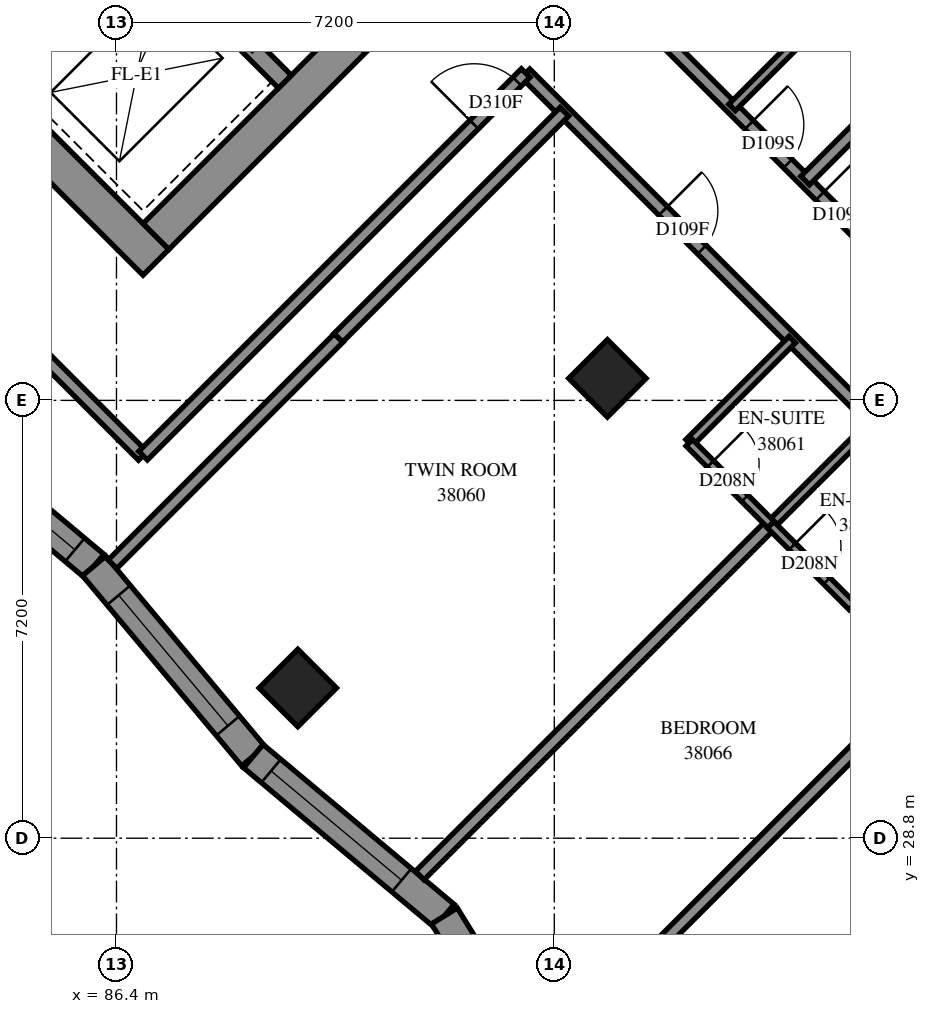
"""IFC4 building model, lengths in metres.
Left out: names, types, materials, properties, quantities, classifications, styles, units other than length and angle.
Written with IfcOpenShell. Run it as: python <this file> out.ifc"""

import sys

from ifc_helpers import new_model, si_unit, direction, frame, frame_2d, origin, origin_2d, place, context, subcontext, project, spatial, polyline, rectangle, outline, extrude, element, fill, save


model = new_model("IFC4")
c1 = context("Model", 3, precision=1e-05, world=origin(), true_north=direction((0.0, 1.0)))
c2 = subcontext(c1, "Body", "Model", "MODEL_VIEW")
j1 = project(units=[si_unit("LENGTHUNIT", "METRE"), si_unit("PLANEANGLEUNIT", "RADIAN")], contexts=[c1])
p1 = place(None, origin())
s1 = spatial("IfcSite", under=j1, at=p1, CompositionType="ELEMENT")
p2 = place(p1, origin())
s2 = spatial("IfcBuilding", under=s1, at=p2, CompositionType="ELEMENT")
p3 = place(p2, frame((0.0, 0.0, 142.2)))
s3 = spatial("IfcBuildingStorey", under=s2, at=p3, CompositionType="ELEMENT", Elevation=142.2)
for number, where, z_axis, x_axis in (
    (1, (94.474, 36.362, 0.0), (0.0, 0.0, 1.0), (0.707, -0.707, 0.0)),
    (2, (89.382, 31.271, 0.0), (0.0, 0.0, 1.0), (0.707, -0.707, 0.0)),
):
    element("IfcColumn", number, at=place(p3, frame(where, z_axis=z_axis, x_axis=x_axis)), inside=s3, PredefinedType="COLUMN", context=c2, shape_type="SweptSolid", body=[
        extrude(rectangle(XDim=0.9, YDim=0.9, at=origin_2d()), origin(), (0.0, 0.0, 1.0), 3.1),
    ])
p4 = place(p3, frame((76.018, 49.302, -0.3), z_axis=(0.0, 0.0, 1.0), x_axis=(0.7071067812, -0.7071067812, 0.0)))
e3 = element("IfcWall", 3, at=p4, inside=s3, PredefinedType="SHEAR", context=c2, shape_type="SweptSolid", body=[
    extrude(rectangle(XDim=15.6, YDim=0.6, at=frame_2d((7.8, 0.0))), origin(), (0.0, 0.0, 1.0), 2.7),
])
p5 = place(p3, frame((87.049, 38.695, -0.3), z_axis=(0.0, 0.0, 1.0), x_axis=(0.7071067812, 0.7071067812, 0.0)))
e4 = element("IfcWall", 4, at=p5, inside=s3, PredefinedType="SHEAR", context=c2, shape_type="SweptSolid", body=[
    extrude(rectangle(XDim=14.4, YDim=0.6, at=frame_2d((7.2, 0.0))), origin(), (0.0, 0.0, 1.0), 2.7),
])
p6 = place(p5, frame((4.55, 0.0, 0.3)))
e5 = element("IfcOpeningElement", 5, at=p6, cuts=e4, PredefinedType="OPENING", context=c2, shape_type="SweptSolid", body=[
    extrude(rectangle(XDim=1.1, YDim=2.1, at=frame_2d((0.55, 1.05))), frame((0.0, 0.31, 0.0), z_axis=(0.0, -1.0, 0.0), x_axis=(1.0, 0.0, 0.0)), (0.0, 0.0, 1.0), 0.62),
])
p7 = place(p5, frame((11.35, 0.0, 0.3)))
e6 = element("IfcOpeningElement", 6, at=p7, cuts=e4, PredefinedType="OPENING", context=c2, shape_type="SweptSolid", body=[
    extrude(rectangle(XDim=1.1, YDim=2.1, at=frame_2d((0.55, 1.05))), frame((0.0, 0.31, 0.0), z_axis=(0.0, -1.0, 0.0), x_axis=(1.0, 0.0, 0.0)), (0.0, 0.0, 1.0), 0.62),
])
p8 = place(p3, frame((84.291, 41.453, 0.0), z_axis=(0.0, 0.0, 1.0), x_axis=(0.7071067812, 0.7071067812, 0.0)))
e7 = element("IfcWall", 7, at=p8, inside=s3, PredefinedType="SOLIDWALL", context=c2, shape_type="SweptSolid", body=[
    extrude(rectangle(XDim=3.3, YDim=0.3, at=frame_2d((1.65, 0.0))), origin(), (0.0, 0.0, 1.0), 3.1),
])
p9 = place(p3, frame((78.988, 51.423, 0.0), z_axis=(0.0, 0.0, 1.0), x_axis=(0.7071067812, -0.7071067812, 0.0)))
e8 = element("IfcWall", 8, at=p9, inside=s3, PredefinedType="SOLIDWALL", context=c2, shape_type="SweptSolid", body=[
    extrude(rectangle(XDim=14.4, YDim=0.3, at=frame_2d((7.2, 0.0))), origin(), (0.0, 0.0, 1.0), 3.1),
])
p10 = place(p9, frame((1.35, 0.0, 0.0)))
e9 = element("IfcOpeningElement", 9, at=p10, cuts=e8, PredefinedType="OPENING", context=c2, shape_type="SweptSolid", body=[
    extrude(rectangle(XDim=0.9, YDim=2.1, at=frame_2d((0.45, 1.05))), frame((0.0, 0.16, 0.0), z_axis=(0.0, -1.0, 0.0), x_axis=(1.0, 0.0, 0.0)), (0.0, 0.0, 1.0), 0.32),
])
p11 = place(p9, frame((4.95, 0.0, 0.0)))
e10 = element("IfcOpeningElement", 10, at=p11, cuts=e8, PredefinedType="OPENING", context=c2, shape_type="SweptSolid", body=[
    extrude(rectangle(XDim=0.9, YDim=2.1, at=frame_2d((0.45, 1.05))), frame((0.0, 0.16, 0.0), z_axis=(0.0, -1.0, 0.0), x_axis=(1.0, 0.0, 0.0)), (0.0, 0.0, 1.0), 0.32),
])
p12 = place(p9, frame((8.55, 0.0, 0.0)))
e11 = element("IfcOpeningElement", 11, at=p12, cuts=e8, PredefinedType="OPENING", context=c2, shape_type="SweptSolid", body=[
    extrude(rectangle(XDim=0.9, YDim=2.1, at=frame_2d((0.45, 1.05))), frame((0.0, 0.16, 0.0), z_axis=(0.0, -1.0, 0.0), x_axis=(1.0, 0.0, 0.0)), (0.0, 0.0, 1.0), 0.32),
])
p13 = place(p9, frame((12.05, 0.0, 0.0)))
e12 = element("IfcOpeningElement", 12, at=p13, cuts=e8, PredefinedType="OPENING", context=c2, shape_type="SweptSolid", body=[
    extrude(rectangle(XDim=1.1, YDim=2.1, at=frame_2d((0.55, 1.05))), frame((0.0, 0.16, 0.0), z_axis=(0.0, -1.0, 0.0), x_axis=(1.0, 0.0, 0.0)), (0.0, 0.0, 1.0), 0.32),
])
p14 = place(p3, frame((82.905, 35.895, 0.0), z_axis=(0.0, 0.0, 1.0), x_axis=(0.7669033121, -0.6417626585, 0.0)))
e13 = element("IfcWall", 13, at=p14, inside=s3, PredefinedType="SOLIDWALL", context=c2, shape_type="SweptSolid", body=[
    extrude(outline(polyline([(-0.022, -0.25), (4.056, -0.25), (4.101, 0.25), (0.022, 0.25), (-0.022, -0.25)])), origin(), (0.0, 0.0, 1.0), 3.1),
])
p15 = place(p14, frame((0.866, 0.0, 0.45)))
e14 = element("IfcOpeningElement", 14, at=p15, cuts=e13, PredefinedType="OPENING", context=c2, shape_type="SweptSolid", body=[
    extrude(rectangle(XDim=2.8, YDim=2.5, at=frame_2d((1.4, 1.25))), frame((0.0, 0.26, 0.0), z_axis=(0.0, -1.0, 0.0), x_axis=(1.0, 0.0, 0.0)), (0.0, 0.0, 1.0), 0.52),
])
p16 = place(p3, frame((86.033, 33.278, 0.0), z_axis=(0.0, 0.0, 1.0), x_axis=(0.641748238, -0.7669153793, 0.0)))
e15 = element("IfcWall", 15, at=p16, inside=s3, PredefinedType="SOLIDWALL", context=c2, shape_type="SweptSolid", body=[
    extrude(outline(polyline([(0.022, -0.25), (4.101, -0.25), (4.056, 0.25), (-0.022, 0.25), (0.022, -0.25)])), origin(), (0.0, 0.0, 1.0), 3.1),
])
p17 = place(p16, frame((0.628, 0.0, 0.45)))
e16 = element("IfcOpeningElement", 16, at=p17, cuts=e15, PredefinedType="OPENING", context=c2, shape_type="SweptSolid", body=[
    extrude(rectangle(XDim=2.8, YDim=2.5, at=frame_2d((1.4, 1.25))), frame((0.0, 0.26, 0.0), z_axis=(0.0, -1.0, 0.0), x_axis=(1.0, 0.0, 0.0)), (0.0, 0.0, 1.0), 0.52),
])
p18 = place(p3, frame((88.65, 30.15, 0.0), z_axis=(0.0, 0.0, 1.0), x_axis=(0.7669272434, -0.6417340597, 0.0)))
e17 = element("IfcWall", 17, at=p18, inside=s3, PredefinedType="SOLIDWALL", context=c2, shape_type="SweptSolid", body=[
    extrude(outline(polyline([(-0.022, -0.25), (4.056, -0.25), (4.137, 0.25), (0.022, 0.25), (-0.022, -0.25)])), origin(), (0.0, 0.0, 1.0), 3.1),
])
p19 = place(p18, frame((0.38, 0.0, 0.45)))
e18 = element("IfcOpeningElement", 18, at=p19, cuts=e17, PredefinedType="OPENING", context=c2, shape_type="SweptSolid", body=[
    extrude(rectangle(XDim=2.8, YDim=2.5, at=frame_2d((1.4, 1.25))), frame((0.0, 0.26, 0.0), z_axis=(0.0, -1.0, 0.0), x_axis=(1.0, 0.0, 0.0)), (0.0, 0.0, 1.0), 0.52),
])
p20 = place(p3, frame((91.792, 27.521, 0.0), z_axis=(0.0, 0.0, 1.0), x_axis=(0.5253300119, -0.8508985713, 0.0)))
e19 = element("IfcWall", 19, at=p20, inside=s3, PredefinedType="SOLIDWALL", context=c2, shape_type="SweptSolid", body=[
    extrude(outline(polyline([(0.041, -0.25), (4.215, -0.25), (3.811, 0.25), (-0.041, 0.25), (0.041, -0.25)])), origin(), (0.0, 0.0, 1.0), 3.1),
])
p21 = place(p20, frame((0.962, 0.0, 0.45)))
e20 = element("IfcOpeningElement", 20, at=p21, cuts=e19, PredefinedType="OPENING", context=c2, shape_type="SweptSolid", body=[
    extrude(rectangle(XDim=1.2, YDim=2.5, at=frame_2d((0.6, 1.25))), frame((0.0, 0.26, 0.0), z_axis=(0.0, -1.0, 0.0), x_axis=(1.0, 0.0, 0.0)), (0.0, 0.0, 1.0), 0.52),
])
p22 = place(p3, frame((93.127, 41.379, 0.0), z_axis=(0.0, 0.0, 1.0), x_axis=(0.7071067812, -0.7071067812, 0.0)))
e21 = element("IfcWall", 21, at=p22, inside=s3, PredefinedType="PARTITIONING", context=c2, shape_type="SweptSolid", body=[
    extrude(rectangle(XDim=9.39, YDim=0.2, at=frame_2d((4.695, 0.0))), origin(), (0.0, 0.0, 1.0), 3.1),
])
p23 = place(p22, frame((3.2, 0.0, 0.0)))
e22 = element("IfcOpeningElement", 22, at=p23, cuts=e21, PredefinedType="OPENING", context=c2, shape_type="SweptSolid", body=[
    extrude(rectangle(XDim=0.9, YDim=2.1, at=frame_2d((0.45, 1.05))), frame((0.0, 0.11, 0.0), z_axis=(0.0, -1.0, 0.0), x_axis=(1.0, 0.0, 0.0)), (0.0, 0.0, 1.0), 0.22),
])
p24 = place(p3, frame((80.423, 41.497, 0.0), z_axis=(0.0, 0.0, 1.0), x_axis=(0.7071067812, -0.7071067812, 0.0)))
e23 = element("IfcWall", 23, at=p24, inside=s3, PredefinedType="PARTITIONING", context=c2, shape_type="SweptSolid", body=[
    extrude(rectangle(XDim=9.065, YDim=0.2, at=frame_2d((4.532, 0.0))), origin(), (0.0, 0.0, 1.0), 3.1),
])
p25 = place(p3, frame((86.837, 35.091, 0.0), z_axis=(0.0, 0.0, 1.0), x_axis=(0.7071067812, 0.7071067812, 0.0)))
e24 = element("IfcWall", 24, at=p25, inside=s3, PredefinedType="PARTITIONING", context=c2, shape_type="SweptSolid", body=[
    extrude(rectangle(XDim=8.898, YDim=0.2, at=frame_2d((4.449, 0.0))), origin(), (0.0, 0.0, 1.0), 3.1),
])
p26 = place(p25, frame((7.7, 0.0, 0.0)))
e25 = element("IfcOpeningElement", 25, at=p26, cuts=e24, PredefinedType="OPENING", context=c2, shape_type="SweptSolid", body=[
    extrude(rectangle(XDim=1.0, YDim=2.1, at=frame_2d((0.5, 1.05))), frame((0.0, 0.11, 0.0), z_axis=(0.0, -1.0, 0.0), x_axis=(1.0, 0.0, 0.0)), (0.0, 0.0, 1.0), 0.22),
])
p27 = place(p3, frame((95.177, 42.157, 0.0), z_axis=(0.0, 0.0, 1.0), x_axis=(0.7071067812, -0.7071067812, 0.0)))
e26 = element("IfcWall", 26, at=p27, inside=s3, PredefinedType="PARTITIONING", context=c2, shape_type="SweptSolid", body=[
    extrude(rectangle(XDim=8.491, YDim=0.2, at=frame_2d((4.245, 0.0))), origin(), (0.0, 0.0, 1.0), 3.1),
])
p28 = place(p27, frame((2.3, 0.0, 0.0)))
e27 = element("IfcOpeningElement", 27, at=p28, cuts=e26, PredefinedType="OPENING", context=c2, shape_type="SweptSolid", body=[
    extrude(rectangle(XDim=0.9, YDim=2.1, at=frame_2d((0.45, 1.05))), frame((0.0, 0.11, 0.0), z_axis=(0.0, -1.0, 0.0), x_axis=(1.0, 0.0, 0.0)), (0.0, 0.0, 1.0), 0.22),
])
p29 = place(p27, frame((3.95, 0.0, 0.0)))
e28 = element("IfcOpeningElement", 28, at=p29, cuts=e26, PredefinedType="OPENING", context=c2, shape_type="SweptSolid", body=[
    extrude(rectangle(XDim=0.9, YDim=2.1, at=frame_2d((0.45, 1.05))), frame((0.0, 0.11, 0.0), z_axis=(0.0, -1.0, 0.0), x_axis=(1.0, 0.0, 0.0)), (0.0, 0.0, 1.0), 0.22),
])
p30 = place(p3, frame((91.387, 28.186, 0.0), z_axis=(0.0, 0.0, 1.0), x_axis=(0.7071067812, 0.7071067812, 0.0)))
e29 = element("IfcWall", 29, at=p30, inside=s3, PredefinedType="PARTITIONING", context=c2, shape_type="SweptSolid", body=[
    extrude(rectangle(XDim=8.164, YDim=0.2, at=frame_2d((4.082, 0.0))), origin(), (0.0, 0.0, 1.0), 3.1),
])
p31 = place(p3, frame((94.923, 26.631, 0.0), z_axis=(0.0, 0.0, 1.0), x_axis=(0.7071067812, 0.7071067812, 0.0)))
e30 = element("IfcWall", 30, at=p31, inside=s3, PredefinedType="PARTITIONING", context=c2, shape_type="SweptSolid", body=[
    extrude(rectangle(XDim=5.926, YDim=0.2, at=frame_2d((2.963, 0.0))), origin(), (0.0, 0.0, 1.0), 2.6),
])
p32 = place(p3, frame((90.047, 37.029, 0.0), z_axis=(0.0, 0.0, 1.0), x_axis=(0.7071067812, 0.7071067812, 0.0)))
e31 = element("IfcWall", 31, at=p32, inside=s3, PredefinedType="PARTITIONING", context=c2, shape_type="SweptSolid", body=[
    extrude(rectangle(XDim=5.258, YDim=0.2, at=frame_2d((2.629, 0.0))), origin(), (0.0, 0.0, 1.0), 3.1),
])
p33 = place(p3, frame((86.335, 33.306, 0.0), z_axis=(0.0, 0.0, 1.0), x_axis=(0.7069165351, 0.7072969761, 0.0)))
e32 = element("IfcWall", 32, at=p33, inside=s3, PredefinedType="PARTITIONING", context=c2, shape_type="SweptSolid", body=[
    extrude(rectangle(XDim=5.257, YDim=0.2, at=frame_2d((2.629, 0.0))), origin(), (0.0, 0.0, 1.0), 3.1),
])
for number, where, z_axis, x_axis in (
    (33, (96.523, 40.817, 0.0), (0.0, 0.0, 1.0), (0.707, 0.707, 0.0)),
    (34, (98.503, 32.615, 0.0), (0.0, 0.0, 1.0), (0.707, 0.707, 0.0)),
):
    element("IfcWall", number, at=place(p3, frame(where, z_axis=z_axis, x_axis=x_axis)), inside=s3, PredefinedType="PARTITIONING", context=c2, shape_type="SweptSolid", body=[
        extrude(rectangle(XDim=2.401, YDim=0.15, at=frame_2d((1.201, 0.0))), origin(), (0.0, 0.0, 1.0), 3.1),
    ])
p34 = place(p3, frame((97.163, 33.955, 0.0), z_axis=(0.0, 0.0, 1.0), x_axis=(0.7075233388, 0.706689978, 0.0)))
e35 = element("IfcWall", 35, at=p34, inside=s3, PredefinedType="PARTITIONING", context=c2, shape_type="SweptSolid", body=[
    extrude(rectangle(XDim=2.4, YDim=0.15, at=frame_2d((1.2, 0.0))), origin(), (0.0, 0.0, 1.0), 3.1),
])
p35 = place(p3, frame((95.817, 35.303, 0.0), z_axis=(0.0, 0.0, 1.0), x_axis=(0.7071067812, 0.7071067812, 0.0)))
e36 = element("IfcWall", 36, at=p35, inside=s3, PredefinedType="PARTITIONING", context=c2, shape_type="SweptSolid", body=[
    extrude(rectangle(XDim=2.398, YDim=0.15, at=frame_2d((1.199, 0.0))), origin(), (0.0, 0.0, 1.0), 3.1),
])
p36 = place(p3, frame((97.725, 39.615, 0.0), z_axis=(0.0, 0.0, 1.0), x_axis=(0.7071067812, 0.7071067812, 0.0)))
e37 = element("IfcWall", 37, at=p36, inside=s3, PredefinedType="PARTITIONING", context=c2, shape_type="SweptSolid", body=[
    extrude(rectangle(XDim=1.966, YDim=0.2, at=frame_2d((0.983, 0.0))), origin(), (0.0, 0.0, 1.0), 3.1),
])
p37 = place(p3, frame((97.157, 33.955, 0.0), z_axis=(0.0, 0.0, 1.0), x_axis=(0.7071067812, -0.7071067812, 0.0)))
e38 = element("IfcWall", 38, at=p37, inside=s3, PredefinedType="PARTITIONING", context=c2, shape_type="SweptSolid", body=[
    extrude(rectangle(XDim=1.901, YDim=0.15, at=frame_2d((0.95, 0.0))), origin(), (0.0, 0.0, 1.0), 3.1),
])
p38 = place(p37, frame((0.506, 0.0, 0.0)))
e39 = element("IfcOpeningElement", 39, at=p38, cuts=e38, PredefinedType="OPENING", context=c2, shape_type="SweptSolid", body=[
    extrude(rectangle(XDim=0.8, YDim=2.1, at=frame_2d((0.4, 1.05))), frame((0.0, 0.085, 0.0), z_axis=(0.0, -1.0, 0.0), x_axis=(1.0, 0.0, 0.0)), (0.0, 0.0, 1.0), 0.17),
])
p39 = place(p3, frame((95.82, 35.304, 0.0), z_axis=(0.0, 0.0, 1.0), x_axis=(0.7065800724, -0.7076330979, 0.0)))
e40 = element("IfcWall", 40, at=p39, inside=s3, PredefinedType="PARTITIONING", context=c2, shape_type="SweptSolid", body=[
    extrude(rectangle(XDim=1.899, YDim=0.15, at=frame_2d((0.95, 0.0))), origin(), (0.0, 0.0, 1.0), 3.1),
])
p40 = place(p39, frame((0.493, 0.0, 0.0)))
e41 = element("IfcOpeningElement", 41, at=p40, cuts=e40, PredefinedType="OPENING", context=c2, shape_type="SweptSolid", body=[
    extrude(rectangle(XDim=0.8, YDim=2.1, at=frame_2d((0.4, 1.05))), frame((0.0, 0.085, 0.0), z_axis=(0.0, -1.0, 0.0), x_axis=(1.0, 0.0, 0.0)), (0.0, 0.0, 1.0), 0.17),
])
p41 = place(p15, origin())
e42 = element("IfcWindow", 42, at=p41, inside=s3, PartitioningType="SINGLE_PANEL", PredefinedType="WINDOW", context=c2, shape_type="SweptSolid", body=[
    extrude(rectangle(XDim=2.8, YDim=2.5, at=frame_2d((1.4, 1.25))), frame((0.0, 0.18, 0.0), z_axis=(0.0, -1.0, 0.0), x_axis=(1.0, 0.0, 0.0)), (0.0, 0.0, 1.0), 0.06),
])
fill(e14, e42)
p42 = place(p17, origin())
e43 = element("IfcWindow", 43, at=p42, inside=s3, PartitioningType="SINGLE_PANEL", PredefinedType="WINDOW", context=c2, shape_type="SweptSolid", body=[
    extrude(rectangle(XDim=2.8, YDim=2.5, at=frame_2d((1.4, 1.25))), frame((0.0, 0.18, 0.0), z_axis=(0.0, -1.0, 0.0), x_axis=(1.0, 0.0, 0.0)), (0.0, 0.0, 1.0), 0.06),
])
fill(e16, e43)
p43 = place(p19, origin())
e44 = element("IfcWindow", 44, at=p43, inside=s3, PartitioningType="SINGLE_PANEL", PredefinedType="WINDOW", context=c2, shape_type="SweptSolid", body=[
    extrude(rectangle(XDim=2.8, YDim=2.5, at=frame_2d((1.4, 1.25))), frame((0.0, 0.18, 0.0), z_axis=(0.0, -1.0, 0.0), x_axis=(1.0, 0.0, 0.0)), (0.0, 0.0, 1.0), 0.06),
])
fill(e18, e44)
p44 = place(p28, origin())
e45 = element("IfcDoor", 45, at=p44, inside=s3, OperationType="SINGLE_SWING_RIGHT", PredefinedType="DOOR", context=c2, shape_type="SweptSolid", body=[
    extrude(rectangle(XDim=0.9, YDim=2.1, at=frame_2d((0.45, 1.05))), frame((0.0, 0.025, 0.0), z_axis=(0.0, -1.0, 0.0), x_axis=(1.0, 0.0, 0.0)), (0.0, 0.0, 1.0), 0.05),
])
fill(e27, e45)
p45 = place(p26, origin())
e46 = element("IfcDoor", 46, at=p45, inside=s3, OperationType="SINGLE_SWING_LEFT", PredefinedType="DOOR", context=c2, shape_type="SweptSolid", body=[
    extrude(rectangle(XDim=1.0, YDim=2.1, at=frame_2d((0.5, 1.05))), frame((0.0, 0.025, 0.0), z_axis=(0.0, -1.0, 0.0), x_axis=(1.0, 0.0, 0.0)), (0.0, 0.0, 1.0), 0.05),
])
fill(e25, e46)
p46 = place(p23, origin())
e47 = element("IfcDoor", 47, at=p46, inside=s3, OperationType="SINGLE_SWING_LEFT", PredefinedType="DOOR", context=c2, shape_type="SweptSolid", body=[
    extrude(rectangle(XDim=0.9, YDim=2.1, at=frame_2d((0.45, 1.05))), frame((0.0, 0.025, 0.0), z_axis=(0.0, -1.0, 0.0), x_axis=(1.0, 0.0, 0.0)), (0.0, 0.0, 1.0), 0.05),
])
fill(e22, e47)
p47 = place(p40, origin())
e48 = element("IfcDoor", 48, at=p47, inside=s3, OperationType="SINGLE_SWING_RIGHT", PredefinedType="DOOR", context=c2, shape_type="SweptSolid", body=[
    extrude(rectangle(XDim=0.8, YDim=2.1, at=frame_2d((0.4, 1.05))), frame((0.0, 0.025, 0.0), z_axis=(0.0, -1.0, 0.0), x_axis=(1.0, 0.0, 0.0)), (0.0, 0.0, 1.0), 0.05),
])
fill(e41, e48)
p48 = place(p29, origin())
e49 = element("IfcDoor", 49, at=p48, inside=s3, OperationType="SINGLE_SWING_LEFT", PredefinedType="DOOR", context=c2, shape_type="SweptSolid", body=[
    extrude(rectangle(XDim=0.9, YDim=2.1, at=frame_2d((0.45, 1.05))), frame((0.0, 0.025, 0.0), z_axis=(0.0, -1.0, 0.0), x_axis=(1.0, 0.0, 0.0)), (0.0, 0.0, 1.0), 0.05),
])
fill(e28, e49)
p49 = place(p38, origin())
e50 = element("IfcDoor", 50, at=p49, inside=s3, OperationType="SINGLE_SWING_RIGHT", PredefinedType="DOOR", context=c2, shape_type="SweptSolid", body=[
    extrude(rectangle(XDim=0.8, YDim=2.1, at=frame_2d((0.4, 1.05))), frame((0.0, 0.025, 0.0), z_axis=(0.0, -1.0, 0.0), x_axis=(1.0, 0.0, 0.0)), (0.0, 0.0, 1.0), 0.05),
])
fill(e39, e50)
save(model, sys.argv[1])
